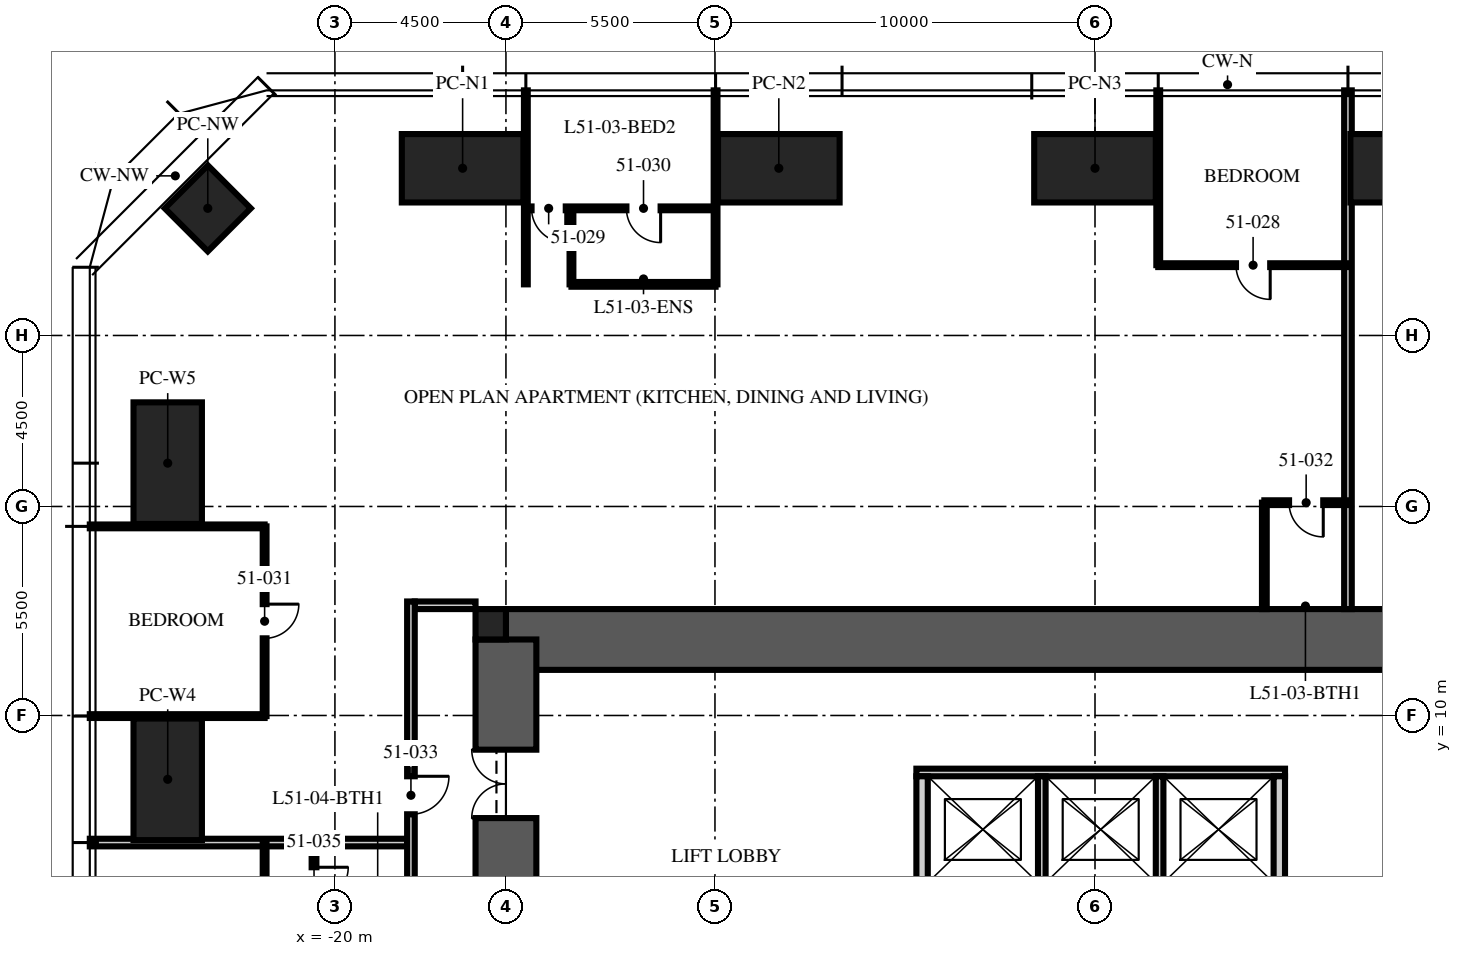
"""IFC4 building model, lengths in metres.
Left out: names, types, materials, properties, quantities, classifications, styles, units other than length and angle.
Written with IfcOpenShell. Run it as: python <this file> out.ifc"""

import sys

from ifc_helpers import new_model, si_unit, direction, frame, frame_2d, origin, origin_2d, place, context, subcontext, project, spatial, rectangle, hollow_rectangle, extrude, element, fill, save


model = new_model("IFC4")
c1 = context("Model", 3, precision=1e-05, world=origin(), true_north=direction((0.0, 1.0)))
c2 = subcontext(c1, "Body", "Model", "MODEL_VIEW")
j1 = project(units=[si_unit("LENGTHUNIT", "METRE"), si_unit("PLANEANGLEUNIT", "RADIAN")], contexts=[c1])
p1 = place(None, origin())
s1 = spatial("IfcSite", under=j1, at=p1, CompositionType="ELEMENT")
p2 = place(p1, origin())
s2 = spatial("IfcBuilding", under=s1, at=p2, CompositionType="ELEMENT")
p3 = place(p2, frame((0.0, 0.0, 207.0)))
s3 = spatial("IfcBuildingStorey", under=s2, at=p3, CompositionType="ELEMENT", Elevation=207.0)
p4 = place(p3, frame((-15.5, 12.0, -0.25), z_axis=(0.0, 0.0, 1.0), x_axis=(1.0, 0.0, 0.0)))
e1 = element("IfcWall", 1, at=p4, inside=s3, PredefinedType="SHEAR", context=c2, shape_type="SweptSolid", body=[
    extrude(rectangle(XDim=31.0, YDim=1.6, at=frame_2d((15.5, 0.0))), origin(), (0.0, 0.0, 1.0), 3.75),
])
p5 = place(p3, frame((-15.5, -12.0, -0.25), z_axis=(0.0, 0.0, 1.0), x_axis=(0.0, 1.0, 0.0)))
e2 = element("IfcWall", 2, at=p5, inside=s3, PredefinedType="SHEAR", context=c2, shape_type="SweptSolid", body=[
    extrude(rectangle(XDim=24.0, YDim=1.6, at=frame_2d((12.0, 0.0))), origin(), (0.0, 0.0, 1.0), 3.75),
])
p6 = place(p5, frame((3.2, 0.0, 0.25)))
e3 = element("IfcOpeningElement", 3, at=p6, cuts=e2, PredefinedType="OPENING", context=c2, shape_type="SweptSolid", body=[
    extrude(rectangle(XDim=1.2, YDim=2.1, at=frame_2d((0.6, 1.05))), frame((0.0, 0.81, 0.0), z_axis=(0.0, -1.0, 0.0), x_axis=(1.0, 0.0, 0.0)), (0.0, 0.0, 1.0), 1.62),
])
p7 = place(p5, frame((19.3, 0.0, 0.25)))
e4 = element("IfcOpeningElement", 4, at=p7, cuts=e2, PredefinedType="OPENING", context=c2, shape_type="SweptSolid", body=[
    extrude(rectangle(XDim=1.8, YDim=2.1, at=frame_2d((0.9, 1.05))), frame((0.0, 0.81, 0.0), z_axis=(0.0, -1.0, 0.0), x_axis=(1.0, 0.0, 0.0)), (0.0, 0.0, 1.0), 1.62),
])
p8 = place(p3, frame((-15.9, 12.4, -0.25), z_axis=(0.0, 0.0, 1.0), x_axis=(1.0, 0.0, 0.0)))
e5 = element("IfcColumn", 5, at=p8, inside=s3, PredefinedType="COLUMN", context=c2, shape_type="SweptSolid", body=[
    extrude(rectangle(XDim=0.8, YDim=0.8, at=origin_2d()), origin(), (0.0, 0.0, 1.0), 3.75),
])
for number, where, z_axis, x_axis in (
    (6, (-16.64, 24.4, 0.0), (0.0, 0.0, 1.0), (1.0, 0.0, 0.0)),
    (7, (-8.32, 24.4, 0.0), (0.0, 0.0, 1.0), (1.0, 0.0, 0.0)),
    (8, (0.0, 24.4, 0.0), (0.0, 0.0, 1.0), (1.0, 0.0, 0.0)),
    (9, (8.32, 24.4, 0.0), (0.0, 0.0, 1.0), (1.0, 0.0, 0.0)),
    (10, (-24.4, 8.32, 0.0), (0.0, 0.0, 1.0), (0.0, 1.0, 0.0)),
    (11, (-24.4, 16.64, 0.0), (0.0, 0.0, 1.0), (0.0, 1.0, 0.0)),
):
    element("IfcColumn", number, at=place(p3, frame(where, z_axis=z_axis, x_axis=x_axis)), inside=s3, PredefinedType="COLUMN", context=c2, shape_type="SweptSolid", body=[
        extrude(hollow_rectangle(XDim=3.2, YDim=1.8, WallThickness=0.2, at=origin_2d()), origin(), (0.0, 0.0, 1.0), 3.75),
    ])
p9 = place(p3, frame((-23.346, 23.346, 0.0), z_axis=(0.0, 0.0, 1.0), x_axis=(0.707106781187, 0.707106781187, 0.0)))
e12 = element("IfcColumn", 12, at=p9, inside=s3, PredefinedType="COLUMN", context=c2, shape_type="SweptSolid", body=[
    extrude(hollow_rectangle(XDim=1.6, YDim=1.6, WallThickness=0.1, at=origin_2d()), origin(), (0.0, 0.0, 1.0), 3.75),
])
p10 = place(p3, frame((-4.7, 8.5, 0.0), z_axis=(0.0, 0.0, 1.0), x_axis=(1.0, 0.0, 0.0)))
e13 = element("IfcWall", 13, at=p10, inside=s3, PredefinedType="PARTITIONING", context=c2, shape_type="SweptSolid", body=[
    extrude(rectangle(XDim=9.7, YDim=0.2, at=frame_2d((4.85, 0.0))), origin(), (0.0, 0.0, 1.0), 3.5),
])
for number, where, z_axis, x_axis in (
    (14, (-4.55, 5.6, 0.0), (0.0, 0.0, 1.0), (0.0, 1.0, 0.0)),
    (15, (4.85, 5.6, 0.0), (0.0, 0.0, 1.0), (0.0, 1.0, 0.0)),
):
    element("IfcWall", number, at=place(p3, frame(where, z_axis=z_axis, x_axis=x_axis)), inside=s3, PredefinedType="PARTITIONING", context=c2, shape_type="SweptSolid", body=[
        extrude(rectangle(XDim=2.8, YDim=0.3, at=frame_2d((1.4, 0.0))), origin(), (0.0, 0.0, 1.0), 3.5),
    ])
for number, where, z_axis, x_axis in (
    (16, (-1.4, 5.6, 0.0), (0.0, 0.0, 1.0), (0.0, 1.0, 0.0)),
    (17, (1.7, 5.6, 0.0), (0.0, 0.0, 1.0), (0.0, 1.0, 0.0)),
):
    element("IfcWall", number, at=place(p3, frame(where, z_axis=z_axis, x_axis=x_axis)), inside=s3, PredefinedType="PARTITIONING", context=c2, shape_type="SweptSolid", body=[
        extrude(rectangle(XDim=2.8, YDim=0.2, at=frame_2d((1.4, 0.0))), origin(), (0.0, 0.0, 1.0), 3.5),
    ])
p11 = place(p3, frame((-16.3, 12.9, 0.0), z_axis=(0.0, 0.0, 1.0), x_axis=(-1.0, 0.0, 0.0)))
e18 = element("IfcWall", 18, at=p11, inside=s3, PredefinedType="PARTITIONING", context=c2, shape_type="SweptSolid", body=[
    extrude(rectangle(XDim=1.6, YDim=0.2, at=frame_2d((0.8, 0.0))), origin(), (0.0, 0.0, 1.0), 2.3),
])
p12 = place(p3, frame((6.656, 12.8, 0.0), z_axis=(0.0, 0.0, 1.0), x_axis=(0.0, 1.0, 0.0)))
e19 = element("IfcWall", 19, at=p12, inside=s3, PredefinedType="PARTITIONING", context=c2, shape_type="SweptSolid", body=[
    extrude(rectangle(XDim=13.65, YDim=0.2, at=frame_2d((6.825, 0.0))), origin(), (0.0, 0.0, 1.0), 2.91),
])
p13 = place(p3, frame((1.664, 21.85, 0.0), z_axis=(0.0, 0.0, 1.0), x_axis=(0.0, 1.0, 0.0)))
e20 = element("IfcWall", 20, at=p13, inside=s3, PredefinedType="PARTITIONING", context=c2, shape_type="SweptSolid", body=[
    extrude(rectangle(XDim=4.6, YDim=0.1, at=frame_2d((2.3, 0.0))), origin(), (0.0, 0.0, 1.0), 2.91),
])
for number, where, z_axis, x_axis in (
    (21, (-9.984, 21.345, 0.0), (0.0, 0.0, 1.0), (0.0, 1.0, 0.0)),
    (22, (-14.976, 21.345, 0.0), (0.0, 0.0, 1.0), (0.0, 1.0, 0.0)),
):
    element("IfcWall", number, at=place(p3, frame(where, z_axis=z_axis, x_axis=x_axis)), inside=s3, PredefinedType="PARTITIONING", context=c2, shape_type="SweptSolid", body=[
        extrude(rectangle(XDim=5.105, YDim=0.1, at=frame_2d((2.552, 0.0))), origin(), (0.0, 0.0, 1.0), 2.91),
    ])
for number, where, z_axis, x_axis in (
    (23, (-21.85, 14.976, 0.0), (0.0, 0.0, 1.0), (-1.0, 0.0, 0.0)),
    (24, (-21.85, 9.984, 0.0), (0.0, 0.0, 1.0), (-1.0, 0.0, 0.0)),
):
    element("IfcWall", number, at=place(p3, frame(where, z_axis=z_axis, x_axis=x_axis)), inside=s3, PredefinedType="PARTITIONING", context=c2, shape_type="SweptSolid", body=[
        extrude(rectangle(XDim=4.6, YDim=0.1, at=frame_2d((2.3, 0.0))), origin(), (0.0, 0.0, 1.0), 2.91),
    ])
p14 = place(p3, frame((-18.1, 6.656, 0.0), z_axis=(0.0, 0.0, 1.0), x_axis=(-1.0, 0.0, 0.0)))
e25 = element("IfcWall", 25, at=p14, inside=s3, PredefinedType="PARTITIONING", context=c2, shape_type="SweptSolid", body=[
    extrude(rectangle(XDim=8.35, YDim=0.2, at=frame_2d((4.175, 0.0))), origin(), (0.0, 0.0, 1.0), 2.91),
])
p15 = place(p3, frame((6.656, 21.85, 0.0), z_axis=(0.0, 0.0, 1.0), x_axis=(-1.0, 0.0, 0.0)))
e26 = element("IfcWall", 26, at=p15, inside=s3, PredefinedType="PARTITIONING", context=c2, shape_type="SweptSolid", body=[
    extrude(rectangle(XDim=4.992, YDim=0.1, at=frame_2d((2.496, 0.0))), origin(), (0.0, 0.0, 1.0), 2.81),
])
p16 = place(p15, frame((2.046, 0.0, 0.0)))
e27 = element("IfcOpeningElement", 27, at=p16, cuts=e26, PredefinedType="OPENING", context=c2, shape_type="SweptSolid", body=[
    extrude(rectangle(XDim=0.9, YDim=2.1, at=frame_2d((0.45, 1.05))), frame((0.0, 0.06, 0.0), z_axis=(0.0, -1.0, 0.0), x_axis=(1.0, 0.0, 0.0)), (0.0, 0.0, 1.0), 0.12),
])
p17 = place(p3, frame((-9.984, 23.345, 0.0), z_axis=(0.0, 0.0, 1.0), x_axis=(-1.0, 0.0, 0.0)))
e28 = element("IfcWall", 28, at=p17, inside=s3, PredefinedType="PARTITIONING", context=c2, shape_type="SweptSolid", body=[
    extrude(rectangle(XDim=4.992, YDim=0.1, at=frame_2d((2.496, 0.0))), origin(), (0.0, 0.0, 1.0), 2.81),
])
p18 = place(p17, frame((3.942, 0.0, 0.0)))
e29 = element("IfcOpeningElement", 29, at=p18, cuts=e28, PredefinedType="OPENING", context=c2, shape_type="SweptSolid", body=[
    extrude(rectangle(XDim=0.9, YDim=2.1, at=frame_2d((0.45, 1.05))), frame((0.0, 0.06, 0.0), z_axis=(0.0, -1.0, 0.0), x_axis=(1.0, 0.0, 0.0)), (0.0, 0.0, 1.0), 0.12),
])
p19 = place(p17, frame((1.446, 0.0, 0.0)))
e30 = element("IfcOpeningElement", 30, at=p19, cuts=e28, PredefinedType="OPENING", context=c2, shape_type="SweptSolid", body=[
    extrude(rectangle(XDim=0.9, YDim=2.1, at=frame_2d((0.45, 1.05))), frame((0.0, 0.06, 0.0), z_axis=(0.0, -1.0, 0.0), x_axis=(1.0, 0.0, 0.0)), (0.0, 0.0, 1.0), 0.12),
])
p20 = place(p3, frame((-13.776, 21.345, 0.0), z_axis=(0.0, 0.0, 1.0), x_axis=(0.0, 1.0, 0.0)))
e31 = element("IfcWall", 31, at=p20, inside=s3, PredefinedType="PARTITIONING", context=c2, shape_type="SweptSolid", body=[
    extrude(rectangle(XDim=2.0, YDim=0.1, at=frame_2d((1.0, 0.0))), origin(), (0.0, 0.0, 1.0), 3.5),
])
p21 = place(p3, frame((-9.984, 21.345, 0.0), z_axis=(0.0, 0.0, 1.0), x_axis=(-1.0, 0.0, 0.0)))
e32 = element("IfcWall", 32, at=p21, inside=s3, PredefinedType="PARTITIONING", context=c2, shape_type="SweptSolid", body=[
    extrude(rectangle(XDim=3.792, YDim=0.125, at=frame_2d((1.896, 0.0))), origin(), (0.0, 0.0, 1.0), 2.81),
])
p22 = place(p3, frame((-21.85, 14.976, 0.0), z_axis=(0.0, 0.0, 1.0), x_axis=(0.0, -1.0, 0.0)))
e33 = element("IfcWall", 33, at=p22, inside=s3, PredefinedType="PARTITIONING", context=c2, shape_type="SweptSolid", body=[
    extrude(rectangle(XDim=4.992, YDim=0.1, at=frame_2d((2.496, 0.0))), origin(), (0.0, 0.0, 1.0), 2.81),
])
p23 = place(p22, frame((2.046, 0.0, 0.0)))
e34 = element("IfcOpeningElement", 34, at=p23, cuts=e33, PredefinedType="OPENING", context=c2, shape_type="SweptSolid", body=[
    extrude(rectangle(XDim=0.9, YDim=2.1, at=frame_2d((0.45, 1.05))), frame((0.0, 0.06, 0.0), z_axis=(0.0, -1.0, 0.0), x_axis=(1.0, 0.0, 0.0)), (0.0, 0.0, 1.0), 0.12),
])
p24 = place(p3, frame((6.656, 15.6, 0.0), z_axis=(0.0, 0.0, 1.0), x_axis=(-1.0, 0.0, 0.0)))
e35 = element("IfcWall", 35, at=p24, inside=s3, PredefinedType="PARTITIONING", context=c2, shape_type="SweptSolid", body=[
    extrude(rectangle(XDim=2.2, YDim=0.125, at=frame_2d((1.1, 0.0))), origin(), (0.0, 0.0, 1.0), 3.5),
])
p25 = place(p24, frame((0.65, 0.0, 0.0)))
e36 = element("IfcOpeningElement", 36, at=p25, cuts=e35, PredefinedType="OPENING", context=c2, shape_type="SweptSolid", body=[
    extrude(rectangle(XDim=0.9, YDim=2.1, at=frame_2d((0.45, 1.05))), frame((0.0, 0.073, 0.0), z_axis=(0.0, -1.0, 0.0), x_axis=(1.0, 0.0, 0.0)), (0.0, 0.0, 1.0), 0.145),
])
p26 = place(p3, frame((4.456, 12.8, 0.0), z_axis=(0.0, 0.0, 1.0), x_axis=(0.0, 1.0, 0.0)))
e37 = element("IfcWall", 37, at=p26, inside=s3, PredefinedType="PARTITIONING", context=c2, shape_type="SweptSolid", body=[
    extrude(rectangle(XDim=2.8, YDim=0.125, at=frame_2d((1.4, 0.0))), origin(), (0.0, 0.0, 1.0), 3.5),
])
p27 = place(p3, frame((-21.85, 6.656, 0.0), z_axis=(0.0, 0.0, 1.0), x_axis=(0.0, -1.0, 0.0)))
e38 = element("IfcWall", 38, at=p27, inside=s3, PredefinedType="PARTITIONING", context=c2, shape_type="SweptSolid", body=[
    extrude(rectangle(XDim=4.992, YDim=0.1, at=frame_2d((2.496, 0.0))), origin(), (0.0, 0.0, 1.0), 2.81),
])
p28 = place(p27, frame((2.046, 0.0, 0.0)))
e39 = element("IfcOpeningElement", 39, at=p28, cuts=e38, PredefinedType="OPENING", context=c2, shape_type="SweptSolid", body=[
    extrude(rectangle(XDim=0.9, YDim=2.1, at=frame_2d((0.45, 1.05))), frame((0.0, 0.06, 0.0), z_axis=(0.0, -1.0, 0.0), x_axis=(1.0, 0.0, 0.0)), (0.0, 0.0, 1.0), 0.12),
])
p29 = place(p3, frame((-20.55, 6.656, 0.0), z_axis=(0.0, 0.0, 1.0), x_axis=(0.0, -1.0, 0.0)))
e40 = element("IfcWall", 40, at=p29, inside=s3, PredefinedType="PARTITIONING", context=c2, shape_type="SweptSolid", body=[
    extrude(rectangle(XDim=2.2, YDim=0.125, at=frame_2d((1.1, 0.0))), origin(), (0.0, 0.0, 1.0), 3.5),
])
p30 = place(p29, frame((0.65, 0.0, 0.0)))
e41 = element("IfcOpeningElement", 41, at=p30, cuts=e40, PredefinedType="OPENING", context=c2, shape_type="SweptSolid", body=[
    extrude(rectangle(XDim=0.9, YDim=2.1, at=frame_2d((0.45, 1.05))), frame((0.0, 0.073, 0.0), z_axis=(0.0, -1.0, 0.0), x_axis=(1.0, 0.0, 0.0)), (0.0, 0.0, 1.0), 0.145),
])
p31 = place(p3, frame((-18.0, 13.0, 0.0), z_axis=(0.0, 0.0, 1.0), x_axis=(0.0, -1.0, 0.0)))
e42 = element("IfcWall", 42, at=p31, inside=s3, PredefinedType="PARTITIONING", context=c2, shape_type="SweptSolid", body=[
    extrude(rectangle(XDim=26.0, YDim=0.2, at=frame_2d((13.0, 0.0))), origin(), (0.0, 0.0, 1.0), 2.6),
])
p32 = place(p31, frame((4.6, 0.0, 0.0)))
e43 = element("IfcOpeningElement", 43, at=p32, cuts=e42, PredefinedType="OPENING", context=c2, shape_type="SweptSolid", body=[
    extrude(rectangle(XDim=1.0, YDim=2.2, at=frame_2d((0.5, 1.1))), frame((0.0, 0.11, 0.0), z_axis=(0.0, -1.0, 0.0), x_axis=(1.0, 0.0, 0.0)), (0.0, 0.0, 1.0), 0.22),
])
p33 = place(p31, frame((18.114, 0.0, 0.0)))
e44 = element("IfcOpeningElement", 44, at=p33, cuts=e42, PredefinedType="OPENING", context=c2, shape_type="SweptSolid", body=[
    extrude(rectangle(XDim=1.0, YDim=2.2, at=frame_2d((0.5, 1.1))), frame((0.0, 0.11, 0.0), z_axis=(0.0, -1.0, 0.0), x_axis=(1.0, 0.0, 0.0)), (0.0, 0.0, 1.0), 0.22),
])
p34 = place(p31, frame((23.676, 0.0, 0.0)))
e45 = element("IfcOpeningElement", 45, at=p34, cuts=e42, PredefinedType="OPENING", context=c2, shape_type="SweptSolid", body=[
    extrude(rectangle(XDim=1.0, YDim=2.2, at=frame_2d((0.5, 1.1))), frame((0.0, 0.11, 0.0), z_axis=(0.0, -1.0, 0.0), x_axis=(1.0, 0.0, 0.0)), (0.0, 0.0, 1.0), 0.22),
])
p35 = place(p7, origin())
e46 = element("IfcDoor", 46, at=p35, inside=s3, OperationType="DOUBLE_DOOR_SINGLE_SWING", PredefinedType="DOOR", context=c2, shape_type="SweptSolid", body=[
    extrude(rectangle(XDim=1.8, YDim=2.1, at=frame_2d((0.9, 1.05))), frame((0.0, 0.025, 0.0), z_axis=(0.0, -1.0, 0.0), x_axis=(1.0, 0.0, 0.0)), (0.0, 0.0, 1.0), 0.05),
])
fill(e4, e46)
p36 = place(p16, origin())
e47 = element("IfcDoor", 47, at=p36, inside=s3, OperationType="SINGLE_SWING_LEFT", PredefinedType="DOOR", context=c2, shape_type="SweptSolid", body=[
    extrude(rectangle(XDim=0.9, YDim=2.1, at=frame_2d((0.45, 1.05))), frame((0.0, 0.025, 0.0), z_axis=(0.0, -1.0, 0.0), x_axis=(1.0, 0.0, 0.0)), (0.0, 0.0, 1.0), 0.05),
])
fill(e27, e47)
p37 = place(p18, origin())
e48 = element("IfcDoor", 48, at=p37, inside=s3, OperationType="SINGLE_SWING_LEFT", PredefinedType="DOOR", context=c2, shape_type="SweptSolid", body=[
    extrude(rectangle(XDim=0.9, YDim=2.1, at=frame_2d((0.45, 1.05))), frame((0.0, 0.025, 0.0), z_axis=(0.0, -1.0, 0.0), x_axis=(1.0, 0.0, 0.0)), (0.0, 0.0, 1.0), 0.05),
])
fill(e29, e48)
p38 = place(p19, origin())
e49 = element("IfcDoor", 49, at=p38, inside=s3, OperationType="SINGLE_SWING_LEFT", PredefinedType="DOOR", context=c2, shape_type="SweptSolid", body=[
    extrude(rectangle(XDim=0.9, YDim=2.1, at=frame_2d((0.45, 1.05))), frame((0.0, 0.025, 0.0), z_axis=(0.0, -1.0, 0.0), x_axis=(1.0, 0.0, 0.0)), (0.0, 0.0, 1.0), 0.05),
])
fill(e30, e49)
p39 = place(p23, origin())
e50 = element("IfcDoor", 50, at=p39, inside=s3, OperationType="SINGLE_SWING_LEFT", PredefinedType="DOOR", context=c2, shape_type="SweptSolid", body=[
    extrude(rectangle(XDim=0.9, YDim=2.1, at=frame_2d((0.45, 1.05))), frame((0.0, 0.025, 0.0), z_axis=(0.0, -1.0, 0.0), x_axis=(1.0, 0.0, 0.0)), (0.0, 0.0, 1.0), 0.05),
])
fill(e34, e50)
p40 = place(p25, origin())
e51 = element("IfcDoor", 51, at=p40, inside=s3, OperationType="SINGLE_SWING_LEFT", PredefinedType="DOOR", context=c2, shape_type="SweptSolid", body=[
    extrude(rectangle(XDim=0.9, YDim=2.1, at=frame_2d((0.45, 1.05))), frame((0.0, 0.025, 0.0), z_axis=(0.0, -1.0, 0.0), x_axis=(1.0, 0.0, 0.0)), (0.0, 0.0, 1.0), 0.05),
])
fill(e36, e51)
p41 = place(p32, origin())
e52 = element("IfcDoor", 52, at=p41, inside=s3, OperationType="SINGLE_SWING_LEFT", PredefinedType="DOOR", context=c2, shape_type="SweptSolid", body=[
    extrude(rectangle(XDim=1.0, YDim=2.2, at=frame_2d((0.5, 1.1))), frame((0.0, 0.025, 0.0), z_axis=(0.0, -1.0, 0.0), x_axis=(1.0, 0.0, 0.0)), (0.0, 0.0, 1.0), 0.05),
])
fill(e43, e52)
p42 = place(p30, origin())
e53 = element("IfcDoor", 53, at=p42, inside=s3, OperationType="SINGLE_SWING_LEFT", PredefinedType="DOOR", context=c2, shape_type="SweptSolid", body=[
    extrude(rectangle(XDim=0.9, YDim=2.1, at=frame_2d((0.45, 1.05))), frame((0.0, 0.025, 0.0), z_axis=(0.0, -1.0, 0.0), x_axis=(1.0, 0.0, 0.0)), (0.0, 0.0, 1.0), 0.05),
])
fill(e41, e53)
save(model, sys.argv[1])
